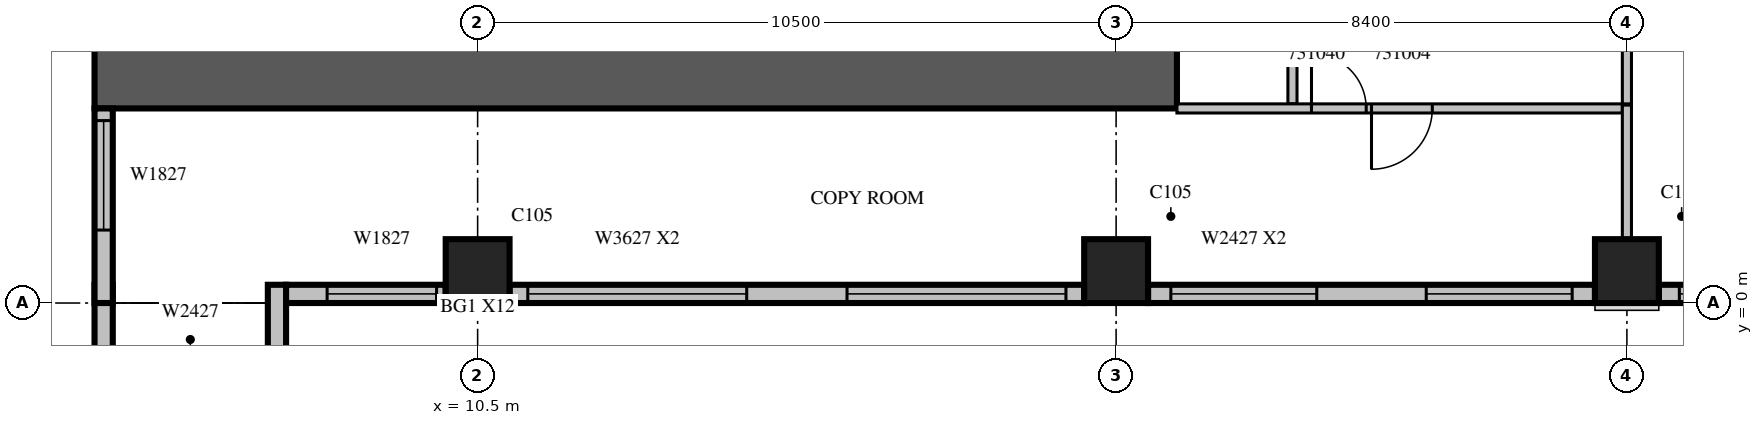
"""IFC4 building model, lengths in metres.
Left out: names, types, materials, properties, quantities, classifications, styles, units other than length and angle.
Written with IfcOpenShell. Run it as: python <this file> out.ifc"""

import sys

from ifc_helpers import new_model, si_unit, direction, frame, frame_2d, origin, origin_2d, place, context, subcontext, project, spatial, rectangle, extrude, source, transform, mapped, element, fill, save


model = new_model("IFC4")
c1 = context("Model", 3, precision=1e-05, world=origin(), true_north=direction((0.0, 1.0)))
c2 = subcontext(c1, "Body", "Model", "MODEL_VIEW")
j1 = project(units=[si_unit("LENGTHUNIT", "METRE"), si_unit("PLANEANGLEUNIT", "RADIAN")], contexts=[c1])
p1 = place(None, origin())
s1 = spatial("IfcSite", under=j1, at=p1, CompositionType="ELEMENT")
p2 = place(p1, origin())
s2 = spatial("IfcBuilding", under=s1, at=p2, CompositionType="ELEMENT")
p3 = place(p2, frame((0.0, 0.0, 141.3)))
s3 = spatial("IfcBuildingStorey", under=s2, at=p3, CompositionType="ELEMENT", Elevation=141.3)
m1 = source(origin(), c2, "Body", "SweptSolid", [
    extrude(rectangle(XDim=1.05, YDim=1.05, at=origin_2d()), origin(), (0.0, 0.0, 1.0), 4.2),
])
for number, where, z_axis, x_axis in (
    (1, (10.5, 0.525, 0.0), (0.0, 0.0, 1.0), (1.0, 0.0, 0.0)),
    (2, (21.0, 0.525, 0.0), (0.0, 0.0, 1.0), (1.0, 0.0, 0.0)),
    (3, (29.4, 0.525, 0.0), (0.0, 0.0, 1.0), (1.0, 0.0, 0.0)),
):
    element("IfcColumn", number, at=place(p3, frame(where, z_axis=z_axis, x_axis=x_axis)), inside=s3, PredefinedType="COLUMN", context=c2, shape_type="MappedRepresentation", body=[
        mapped(m1, transform((0.0, 0.0, 0.0), scale=1.0)),
    ])
m2 = source(origin(), c2, "Body", "SweptSolid", [
    extrude(rectangle(XDim=17.8, YDim=1.0, at=frame_2d((8.9, 0.0))), origin(), (0.0, 0.0, 1.0), 4.2),
])
p4 = place(p3, frame((4.2, 3.7, 0.0), z_axis=(0.0, 0.0, 1.0), x_axis=(1.0, 0.0, 0.0)))
e4 = element("IfcWall", 4, at=p4, inside=s3, PredefinedType="SHEAR", context=c2, shape_type="MappedRepresentation", body=[
    mapped(m2, transform((0.0, 0.0, 0.0), scale=1.0)),
])
m3 = source(origin(), c2, "Body", "SweptSolid", [
    extrude(rectangle(XDim=1.2, YDim=0.3, at=frame_2d((0.6, 0.0))), origin(), (0.0, 0.0, 1.0), 3.8),
])
for number, where, z_axis, x_axis in (
    (5, (4.35, 0.3, 0.0), (0.0, 0.0, 1.0), (0.0, -1.0, 0.0)),
    (6, (7.2, 0.3, 0.0), (0.0, 0.0, 1.0), (0.0, -1.0, 0.0)),
):
    element("IfcWall", number, at=place(p3, frame(where, z_axis=z_axis, x_axis=x_axis)), inside=s3, PredefinedType="STANDARD", context=c2, shape_type="MappedRepresentation", body=[
        mapped(m3, transform((0.0, 0.0, 0.0), scale=1.0)),
    ])
m4 = source(origin(), c2, "Body", "SweptSolid", [
    extrude(rectangle(XDim=2.625, YDim=0.3, at=frame_2d((1.312, 0.0))), origin(), (0.0, 0.0, 1.0), 3.8),
])
p5 = place(p3, frame((7.35, 0.15, 0.0), z_axis=(0.0, 0.0, 1.0), x_axis=(1.0, 0.0, 0.0)))
e7 = element("IfcWall", 7, at=p5, inside=s3, PredefinedType="STANDARD", context=c2, shape_type="MappedRepresentation", body=[
    mapped(m4, transform((0.0, 0.0, 0.0), scale=1.0)),
])
m5 = source(origin(), c2, "Body", "SweptSolid", [
    extrude(rectangle(XDim=1.8, YDim=2.7, at=frame_2d((0.9, 1.35))), frame((0.0, 0.16, 0.0), z_axis=(0.0, -1.0, 0.0), x_axis=(1.0, 0.0, 0.0)), (0.0, 0.0, 1.0), 0.32),
])
p6 = place(p5, frame((0.675, 0.0, 0.6)))
e8 = element("IfcOpeningElement", 8, at=p6, cuts=e7, PredefinedType="OPENING", context=c2, shape_type="MappedRepresentation", body=[
    mapped(m5, transform((0.0, 0.0, 0.0), scale=1.0)),
])
m6 = source(origin(), c2, "Body", "SweptSolid", [
    extrude(rectangle(XDim=9.45, YDim=0.3, at=frame_2d((4.725, 0.0))), origin(), (0.0, 0.0, 1.0), 3.8),
])
p7 = place(p3, frame((11.025, 0.15, 0.0), z_axis=(0.0, 0.0, 1.0), x_axis=(1.0, 0.0, 0.0)))
e9 = element("IfcWall", 9, at=p7, inside=s3, PredefinedType="STANDARD", context=c2, shape_type="MappedRepresentation", body=[
    mapped(m6, transform((0.0, 0.0, 0.0), scale=1.0)),
])
m7 = source(origin(), c2, "Body", "SweptSolid", [
    extrude(rectangle(XDim=3.6, YDim=2.7, at=frame_2d((1.8, 1.35))), frame((0.0, 0.16, 0.0), z_axis=(0.0, -1.0, 0.0), x_axis=(1.0, 0.0, 0.0)), (0.0, 0.0, 1.0), 0.32),
])
p8 = place(p7, frame((0.3, 0.0, 0.6)))
e10 = element("IfcOpeningElement", 10, at=p8, cuts=e9, PredefinedType="OPENING", context=c2, shape_type="MappedRepresentation", body=[
    mapped(m7, transform((0.0, 0.0, 0.0), scale=1.0)),
])
p9 = place(p7, frame((5.55, 0.0, 0.6)))
e11 = element("IfcOpeningElement", 11, at=p9, cuts=e9, PredefinedType="OPENING", context=c2, shape_type="MappedRepresentation", body=[
    mapped(m7, transform((0.0, 0.0, 0.0), scale=1.0)),
])
m8 = source(origin(), c2, "Body", "SweptSolid", [
    extrude(rectangle(XDim=7.35, YDim=0.3, at=frame_2d((3.675, 0.0))), origin(), (0.0, 0.0, 1.0), 3.8),
])
p10 = place(p3, frame((21.525, 0.15, 0.0), z_axis=(0.0, 0.0, 1.0), x_axis=(1.0, 0.0, 0.0)))
e12 = element("IfcWall", 12, at=p10, inside=s3, PredefinedType="STANDARD", context=c2, shape_type="MappedRepresentation", body=[
    mapped(m8, transform((0.0, 0.0, 0.0), scale=1.0)),
])
m9 = source(origin(), c2, "Body", "SweptSolid", [
    extrude(rectangle(XDim=2.4, YDim=2.7, at=frame_2d((1.2, 1.35))), frame((0.0, 0.16, 0.0), z_axis=(0.0, -1.0, 0.0), x_axis=(1.0, 0.0, 0.0)), (0.0, 0.0, 1.0), 0.32),
])
p11 = place(p10, frame((0.375, 0.0, 0.6)))
e13 = element("IfcOpeningElement", 13, at=p11, cuts=e12, PredefinedType="OPENING", context=c2, shape_type="MappedRepresentation", body=[
    mapped(m9, transform((0.0, 0.0, 0.0), scale=1.0)),
])
p12 = place(p10, frame((4.575, 0.0, 0.6)))
e14 = element("IfcOpeningElement", 14, at=p12, cuts=e12, PredefinedType="OPENING", context=c2, shape_type="MappedRepresentation", body=[
    mapped(m9, transform((0.0, 0.0, 0.0), scale=1.0)),
])
m10 = source(origin(), c2, "Body", "SweptSolid", [
    extrude(rectangle(XDim=1.875, YDim=0.3, at=frame_2d((0.938, 0.0))), origin(), (0.0, 0.0, 1.0), 3.8),
])
p13 = place(p3, frame((29.925, 0.15, 0.0), z_axis=(0.0, 0.0, 1.0), x_axis=(1.0, 0.0, 0.0)))
e15 = element("IfcWall", 15, at=p13, inside=s3, PredefinedType="STANDARD", context=c2, shape_type="MappedRepresentation", body=[
    mapped(m10, transform((0.0, 0.0, 0.0), scale=1.0)),
])
m11 = source(origin(), c2, "Body", "SweptSolid", [
    extrude(rectangle(XDim=1.2, YDim=2.7, at=frame_2d((0.6, 1.35))), frame((0.0, 0.16, 0.0), z_axis=(0.0, -1.0, 0.0), x_axis=(1.0, 0.0, 0.0)), (0.0, 0.0, 1.0), 0.32),
])
p14 = place(p13, frame((0.338, 0.0, 0.6)))
e16 = element("IfcOpeningElement", 16, at=p14, cuts=e15, PredefinedType="OPENING", context=c2, shape_type="MappedRepresentation", body=[
    mapped(m11, transform((0.0, 0.0, 0.0), scale=1.0)),
])
m12 = source(origin(), c2, "Body", "SweptSolid", [
    extrude(rectangle(XDim=3.2, YDim=0.3, at=frame_2d((1.6, 0.0))), origin(), (0.0, 0.0, 1.0), 3.8),
])
p15 = place(p3, frame((4.35, 3.2, 0.0), z_axis=(0.0, 0.0, 1.0), x_axis=(0.0, -1.0, 0.0)))
e17 = element("IfcWall", 17, at=p15, inside=s3, PredefinedType="STANDARD", context=c2, shape_type="MappedRepresentation", body=[
    mapped(m12, transform((0.0, 0.0, 0.0), scale=1.0)),
])
p16 = place(p15, frame((0.2, 0.0, 0.6)))
e18 = element("IfcOpeningElement", 18, at=p16, cuts=e17, PredefinedType="OPENING", context=c2, shape_type="MappedRepresentation", body=[
    mapped(m5, transform((0.0, 0.0, 0.0), scale=1.0)),
])
m13 = source(origin(), c2, "Body", "SweptSolid", [
    extrude(rectangle(XDim=11.725, YDim=0.15, at=frame_2d((5.862, 0.0))), origin(), (0.0, 0.0, 1.0), 3.8),
])
p17 = place(p3, frame((23.9, 15.0, 0.0), z_axis=(0.0, 0.0, 1.0), x_axis=(0.0, -1.0, 0.0)))
e19 = element("IfcWall", 19, at=p17, inside=s3, PredefinedType="PARTITIONING", context=c2, shape_type="MappedRepresentation", body=[
    mapped(m13, transform((0.0, 0.0, 0.0), scale=1.0)),
])
m14 = source(origin(), c2, "Body", "SweptSolid", [
    extrude(rectangle(XDim=0.9, YDim=2.1, at=frame_2d((0.45, 1.05))), frame((0.0, 0.085, 0.0), z_axis=(0.0, -1.0, 0.0), x_axis=(1.0, 0.0, 0.0)), (0.0, 0.0, 1.0), 0.17),
])
p18 = place(p17, frame((8.863, 0.0, 0.0)))
e20 = element("IfcOpeningElement", 20, at=p18, cuts=e19, PredefinedType="OPENING", context=c2, shape_type="MappedRepresentation", body=[
    mapped(m14, transform((0.0, 0.0, 0.0), scale=1.0)),
])
p19 = place(p17, frame((2.125, 0.0, 0.0)))
e21 = element("IfcOpeningElement", 21, at=p19, cuts=e19, PredefinedType="OPENING", context=c2, shape_type="MappedRepresentation", body=[
    mapped(m14, transform((0.0, 0.0, 0.0), scale=1.0)),
])
m15 = source(origin(), c2, "Body", "SweptSolid", [
    extrude(rectangle(XDim=6.701, YDim=0.15, at=frame_2d((3.35, 0.0))), origin(), (0.0, 0.0, 1.0), 3.8),
])
p20 = place(p3, frame((29.4, 3.275, 0.0), z_axis=(0.0, 0.0, 1.0), x_axis=(0.0, 1.0, 0.0)))
e22 = element("IfcWall", 22, at=p20, inside=s3, PredefinedType="PARTITIONING", context=c2, shape_type="MappedRepresentation", body=[
    mapped(m15, transform((0.0, 0.0, 0.0), scale=1.0)),
])
m16 = source(origin(), c2, "Body", "SweptSolid", [
    extrude(rectangle(XDim=7.325, YDim=0.15, at=frame_2d((3.663, 0.0))), origin(), (0.0, 0.0, 1.0), 3.8),
])
p21 = place(p3, frame((22.0, 3.2, 0.0), z_axis=(0.0, 0.0, 1.0), x_axis=(1.0, 0.0, 0.0)))
e23 = element("IfcWall", 23, at=p21, inside=s3, PredefinedType="PARTITIONING", context=c2, shape_type="MappedRepresentation", body=[
    mapped(m16, transform((0.0, 0.0, 0.0), scale=1.0)),
])
m17 = source(origin(), c2, "Body", "SweptSolid", [
    extrude(rectangle(XDim=1.0, YDim=2.1, at=frame_2d((0.5, 1.05))), frame((0.0, 0.085, 0.0), z_axis=(0.0, -1.0, 0.0), x_axis=(1.0, 0.0, 0.0)), (0.0, 0.0, 1.0), 0.17),
])
p22 = place(p21, frame((3.2, 0.0, 0.0)))
e24 = element("IfcOpeningElement", 24, at=p22, cuts=e23, PredefinedType="OPENING", context=c2, shape_type="MappedRepresentation", body=[
    mapped(m17, transform((0.0, 0.0, 0.0), scale=1.0)),
])
p23 = place(p21, frame((2.213, 0.0, 0.0)))
e25 = element("IfcOpeningElement", 25, at=p23, cuts=e23, PredefinedType="OPENING", context=c2, shape_type="MappedRepresentation", body=[
    mapped(m14, transform((0.0, 0.0, 0.0), scale=1.0)),
])
m18 = source(origin(), c2, "Body", "SweptSolid", [
    extrude(rectangle(XDim=2.206, YDim=0.15, at=frame_2d((1.103, 0.0))), origin(), (0.0, 0.0, 1.0), 3.8),
])
p24 = place(p3, frame((29.4, 1.049, 0.0), z_axis=(0.0, 0.0, 1.0), x_axis=(0.0, 1.0, 0.0)))
e26 = element("IfcWall", 26, at=p24, inside=s3, PredefinedType="PARTITIONING", context=c2, shape_type="MappedRepresentation", body=[
    mapped(m18, transform((0.0, 0.0, 0.0), scale=1.0)),
])
m19 = source(origin(), c2, "Body", "SweptSolid", [
    extrude(rectangle(XDim=1.8, YDim=2.7, at=frame_2d((0.9, 1.35))), frame((0.0, 0.03, 0.0), z_axis=(0.0, -1.0, 0.0), x_axis=(1.0, 0.0, 0.0)), (0.0, 0.0, 1.0), 0.06),
])
p25 = place(p6, origin())
e27 = element("IfcWindow", 27, at=p25, inside=s3, PartitioningType="SINGLE_PANEL", PredefinedType="WINDOW", context=c2, shape_type="MappedRepresentation", body=[
    mapped(m19, transform((0.0, 0.0, 0.0), scale=1.0)),
])
fill(e8, e27)
m20 = source(origin(), c2, "Body", "SweptSolid", [
    extrude(rectangle(XDim=3.6, YDim=2.7, at=frame_2d((1.8, 1.35))), frame((0.0, 0.03, 0.0), z_axis=(0.0, -1.0, 0.0), x_axis=(1.0, 0.0, 0.0)), (0.0, 0.0, 1.0), 0.06),
])
p26 = place(p8, origin())
e28 = element("IfcWindow", 28, at=p26, inside=s3, PartitioningType="SINGLE_PANEL", PredefinedType="WINDOW", context=c2, shape_type="MappedRepresentation", body=[
    mapped(m20, transform((0.0, 0.0, 0.0), scale=1.0)),
])
fill(e10, e28)
p27 = place(p9, origin())
e29 = element("IfcWindow", 29, at=p27, inside=s3, PartitioningType="SINGLE_PANEL", PredefinedType="WINDOW", context=c2, shape_type="MappedRepresentation", body=[
    mapped(m20, transform((0.0, 0.0, 0.0), scale=1.0)),
])
fill(e11, e29)
m21 = source(origin(), c2, "Body", "SweptSolid", [
    extrude(rectangle(XDim=2.4, YDim=2.7, at=frame_2d((1.2, 1.35))), frame((0.0, 0.03, 0.0), z_axis=(0.0, -1.0, 0.0), x_axis=(1.0, 0.0, 0.0)), (0.0, 0.0, 1.0), 0.06),
])
p28 = place(p11, origin())
e30 = element("IfcWindow", 30, at=p28, inside=s3, PartitioningType="SINGLE_PANEL", PredefinedType="WINDOW", context=c2, shape_type="MappedRepresentation", body=[
    mapped(m21, transform((0.0, 0.0, 0.0), scale=1.0)),
])
fill(e13, e30)
p29 = place(p12, origin())
e31 = element("IfcWindow", 31, at=p29, inside=s3, PartitioningType="SINGLE_PANEL", PredefinedType="WINDOW", context=c2, shape_type="MappedRepresentation", body=[
    mapped(m21, transform((0.0, 0.0, 0.0), scale=1.0)),
])
fill(e14, e31)
m22 = source(origin(), c2, "Body", "SweptSolid", [
    extrude(rectangle(XDim=1.2, YDim=2.7, at=frame_2d((0.6, 1.35))), frame((0.0, 0.03, 0.0), z_axis=(0.0, -1.0, 0.0), x_axis=(1.0, 0.0, 0.0)), (0.0, 0.0, 1.0), 0.06),
])
p30 = place(p14, origin())
e32 = element("IfcWindow", 32, at=p30, inside=s3, PartitioningType="SINGLE_PANEL", PredefinedType="WINDOW", context=c2, shape_type="MappedRepresentation", body=[
    mapped(m22, transform((0.0, 0.0, 0.0), scale=1.0)),
])
fill(e16, e32)
p31 = place(p16, origin())
e33 = element("IfcWindow", 33, at=p31, inside=s3, PartitioningType="SINGLE_PANEL", PredefinedType="WINDOW", context=c2, shape_type="MappedRepresentation", body=[
    mapped(m19, transform((0.0, 0.0, 0.0), scale=1.0)),
])
fill(e18, e33)
m23 = source(origin(), c2, "Body", "SweptSolid", [
    extrude(rectangle(XDim=1.0, YDim=2.1, at=frame_2d((0.5, 1.05))), frame((0.0, 0.025, 0.0), z_axis=(0.0, -1.0, 0.0), x_axis=(1.0, 0.0, 0.0)), (0.0, 0.0, 1.0), 0.05),
])
p32 = place(p22, origin())
e34 = element("IfcDoor", 34, at=p32, inside=s3, OperationType="SINGLE_SWING_RIGHT", PredefinedType="DOOR", context=c2, shape_type="MappedRepresentation", body=[
    mapped(m23, transform((0.0, 0.0, 0.0), scale=1.0)),
])
fill(e24, e34)
m24 = source(origin(), c2, "Body", "SweptSolid", [
    extrude(rectangle(XDim=0.9, YDim=2.1, at=frame_2d((0.45, 1.05))), frame((0.0, 0.025, 0.0), z_axis=(0.0, -1.0, 0.0), x_axis=(1.0, 0.0, 0.0)), (0.0, 0.0, 1.0), 0.05),
])
p33 = place(p23, origin())
e35 = element("IfcDoor", 35, at=p33, inside=s3, OperationType="SINGLE_SWING_LEFT", PredefinedType="DOOR", context=c2, shape_type="MappedRepresentation", body=[
    mapped(m24, transform((0.0, 0.0, 0.0), scale=1.0)),
])
fill(e25, e35)
save(model, sys.argv[1])
